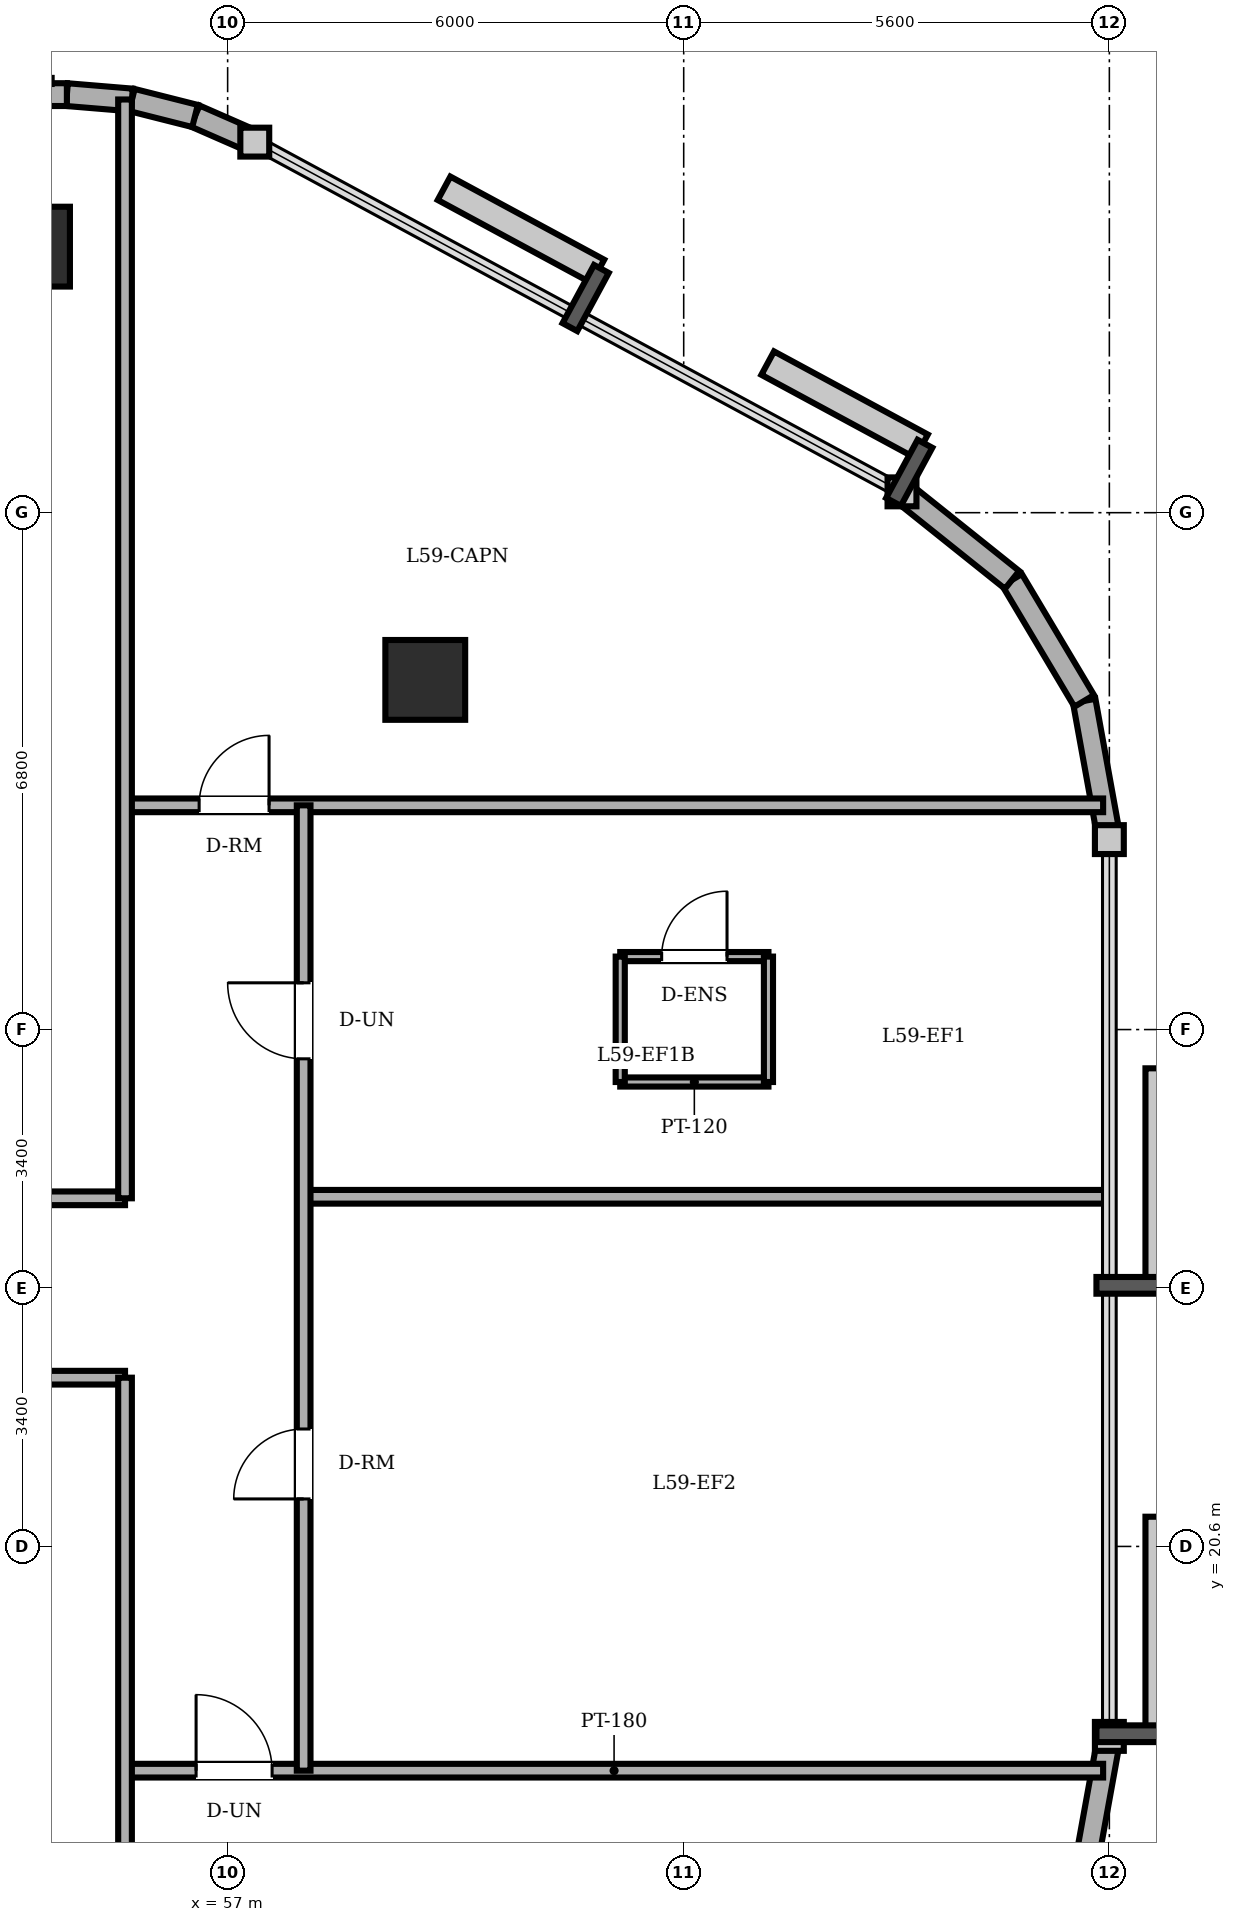
"""IFC4 building model, lengths in metres.
Left out: names, types, materials, properties, quantities, classifications, styles, units other than length and angle.
Written with IfcOpenShell. Run it as: python <this file> out.ifc"""

import sys

from ifc_helpers import new_model, si_unit, direction, frame, frame_2d, origin, origin_2d, place, context, subcontext, project, spatial, rectangle, circle, extrude, element, fill, save


model = new_model("IFC4")
c1 = context("Model", 3, precision=1e-05, world=origin(), true_north=direction((0.0, 1.0)))
c2 = subcontext(c1, "Body", "Model", "MODEL_VIEW")
j1 = project(units=[si_unit("LENGTHUNIT", "METRE"), si_unit("PLANEANGLEUNIT", "RADIAN")], contexts=[c1])
p1 = place(None, origin())
s1 = spatial("IfcSite", under=j1, at=p1, CompositionType="ELEMENT")
p2 = place(p1, origin())
s2 = spatial("IfcBuilding", under=s1, at=p2, CompositionType="ELEMENT")
p3 = place(p2, frame((0.0, 0.0, 226.5)))
s3 = spatial("IfcBuildingStorey", under=s2, at=p3, CompositionType="ELEMENT", Elevation=226.5)
for number, where, z_axis, x_axis in (
    (1, (59.6, 32.0, 0.0), (0.0, 0.0, 1.0), (1.0, 0.0, 0.0)),
    (2, (54.4, 37.7, 0.0), (0.0, 0.0, 1.0), (1.0, 0.0, 0.0)),
):
    element("IfcColumn", number, at=place(p3, frame(where, z_axis=z_axis, x_axis=x_axis)), inside=s3, PredefinedType="COLUMN", context=c2, shape_type="SweptSolid", body=[
        extrude(circle(Radius=0.525, at=origin_2d()), origin(), (0.0, 0.0, 1.0), 3.6),
    ])
for number, where, z_axis, x_axis in (
    (3, (68.269, 16.276, 0.0), (0.0, 0.0, 1.0), (0.178, 0.984, 0.0)),
    (4, (68.6, 29.899, 0.0), (0.0, 0.0, 1.0), (-0.178, 0.984, 0.0)),
):
    element("IfcWall", number, at=place(p3, frame(where, z_axis=z_axis, x_axis=x_axis)), inside=s3, PredefinedType="SOLIDWALL", context=c2, shape_type="SweptSolid", body=[
        extrude(rectangle(XDim=1.855, YDim=0.3, at=frame_2d((0.927, 0.0))), origin(), (0.0, 0.0, 1.0), 3.4),
    ])
p4 = place(p3, frame((68.269, 31.724, 0.0), z_axis=(0.0, 0.0, 1.0), x_axis=(-0.512072018927, 0.858942516955, 0.0)))
e5 = element("IfcWall", 5, at=p4, inside=s3, PredefinedType="SOLIDWALL", context=c2, shape_type="SweptSolid", body=[
    extrude(rectangle(XDim=1.853, YDim=0.3, at=frame_2d((0.927, 0.0))), origin(), (0.0, 0.0, 1.0), 3.4),
])
p5 = place(p3, frame((67.32, 33.316, 0.0), z_axis=(0.0, 0.0, 1.0), x_axis=(-0.780920189257, 0.624630817372, 0.0)))
e6 = element("IfcWall", 6, at=p5, inside=s3, PredefinedType="SOLIDWALL", context=c2, shape_type="SweptSolid", body=[
    extrude(rectangle(XDim=1.854, YDim=0.3, at=frame_2d((0.927, 0.0))), origin(), (0.0, 0.0, 1.0), 3.4),
])
p6 = place(p3, frame((57.357, 39.075, 0.0), z_axis=(0.0, 0.0, 1.0), x_axis=(-0.916085473636, 0.400983048261, 0.0)))
e7 = element("IfcWall", 7, at=p6, inside=s3, PredefinedType="SOLIDWALL", context=c2, shape_type="SweptSolid", body=[
    extrude(rectangle(XDim=0.858, YDim=0.3, at=frame_2d((0.429, 0.0))), origin(), (0.0, 0.0, 1.0), 3.4),
])
p7 = place(p3, frame((56.571, 39.419, 0.0), z_axis=(0.0, 0.0, 1.0), x_axis=(-0.969536346338, 0.244947490555, 0.0)))
e8 = element("IfcWall", 8, at=p7, inside=s3, PredefinedType="SOLIDWALL", context=c2, shape_type="SweptSolid", body=[
    extrude(rectangle(XDim=0.857, YDim=0.3, at=frame_2d((0.429, 0.0))), origin(), (0.0, 0.0, 1.0), 3.4),
])
p8 = place(p3, frame((55.74, 39.629, 0.0), z_axis=(0.0, 0.0, 1.0), x_axis=(-0.996565355958, 0.082809971041, 0.0)))
e9 = element("IfcWall", 9, at=p8, inside=s3, PredefinedType="SOLIDWALL", context=c2, shape_type="SweptSolid", body=[
    extrude(rectangle(XDim=0.858, YDim=0.3, at=frame_2d((0.429, 0.0))), origin(), (0.0, 0.0, 1.0), 3.4),
])
p9 = place(p3, frame((54.885, 39.7, 0.0), z_axis=(0.0, 0.0, 1.0), x_axis=(-1.0, 0.0, 0.0)))
e10 = element("IfcWall", 10, at=p9, inside=s3, PredefinedType="SOLIDWALL", context=c2, shape_type="SweptSolid", body=[
    extrude(rectangle(XDim=32.485, YDim=0.3, at=frame_2d((16.243, 0.0))), origin(), (0.0, 0.0, 1.0), 3.4),
])
p10 = place(p9, frame((23.61, 0.0, 0.0)))
e11 = element("IfcOpeningElement", 11, at=p10, cuts=e10, PredefinedType="OPENING", context=c2, shape_type="SweptSolid", body=[
    extrude(rectangle(XDim=0.95, YDim=2.2, at=frame_2d((0.475, 1.1))), frame((0.0, 0.16, 0.0), z_axis=(0.0, -1.0, 0.0), x_axis=(1.0, 0.0, 0.0)), (0.0, 0.0, 1.0), 0.32),
])
p11 = place(p9, frame((4.57, 0.0, 0.85)))
e12 = element("IfcOpeningElement", 12, at=p11, cuts=e10, PredefinedType="OPENING", context=c2, shape_type="SweptSolid", body=[
    extrude(rectangle(XDim=1.35, YDim=1.55, at=frame_2d((0.675, 0.775))), frame((0.0, 0.16, 0.0), z_axis=(0.0, -1.0, 0.0), x_axis=(1.0, 0.0, 0.0)), (0.0, 0.0, 1.0), 0.32),
])
p12 = place(p9, frame((9.465, 0.0, 0.85)))
e13 = element("IfcOpeningElement", 13, at=p12, cuts=e10, PredefinedType="OPENING", context=c2, shape_type="SweptSolid", body=[
    extrude(rectangle(XDim=1.35, YDim=1.55, at=frame_2d((0.675, 0.775))), frame((0.0, 0.16, 0.0), z_axis=(0.0, -1.0, 0.0), x_axis=(1.0, 0.0, 0.0)), (0.0, 0.0, 1.0), 0.32),
])
p13 = place(p9, frame((16.577, 0.0, 0.85)))
e14 = element("IfcOpeningElement", 14, at=p13, cuts=e10, PredefinedType="OPENING", context=c2, shape_type="SweptSolid", body=[
    extrude(rectangle(XDim=1.35, YDim=1.55, at=frame_2d((0.675, 0.775))), frame((0.0, 0.16, 0.0), z_axis=(0.0, -1.0, 0.0), x_axis=(1.0, 0.0, 0.0)), (0.0, 0.0, 1.0), 0.32),
])
p14 = place(p9, frame((18.793, 0.0, 0.85)))
e15 = element("IfcOpeningElement", 15, at=p14, cuts=e10, PredefinedType="OPENING", context=c2, shape_type="SweptSolid", body=[
    extrude(rectangle(XDim=1.35, YDim=1.55, at=frame_2d((0.675, 0.775))), frame((0.0, 0.16, 0.0), z_axis=(0.0, -1.0, 0.0), x_axis=(1.0, 0.0, 0.0)), (0.0, 0.0, 1.0), 0.32),
])
p15 = place(p9, frame((26.51, 0.0, 0.85)))
e16 = element("IfcOpeningElement", 16, at=p15, cuts=e10, PredefinedType="OPENING", context=c2, shape_type="SweptSolid", body=[
    extrude(rectangle(XDim=1.35, YDim=1.55, at=frame_2d((0.675, 0.775))), frame((0.0, 0.16, 0.0), z_axis=(0.0, -1.0, 0.0), x_axis=(1.0, 0.0, 0.0)), (0.0, 0.0, 1.0), 0.32),
])
p16 = place(p9, frame((29.835, 0.0, 0.85)))
e17 = element("IfcOpeningElement", 17, at=p16, cuts=e10, PredefinedType="OPENING", context=c2, shape_type="SweptSolid", body=[
    extrude(rectangle(XDim=1.35, YDim=1.55, at=frame_2d((0.675, 0.775))), frame((0.0, 0.16, 0.0), z_axis=(0.0, -1.0, 0.0), x_axis=(1.0, 0.0, 0.0)), (0.0, 0.0, 1.0), 0.32),
])
p17 = place(p3, frame((62.165, 28.36, 0.0), z_axis=(0.0, 0.0, 1.0), x_axis=(1.0, 0.0, 0.0)))
e18 = element("IfcWall", 18, at=p17, inside=s3, PredefinedType="PARTITIONING", context=c2, shape_type="SweptSolid", body=[
    extrude(rectangle(XDim=1.95, YDim=0.12, at=frame_2d((0.975, 0.0))), origin(), (0.0, 0.0, 1.0), 3.4),
])
p18 = place(p17, frame((0.545, 0.0, 0.0)))
e19 = element("IfcOpeningElement", 19, at=p18, cuts=e18, PredefinedType="OPENING", context=c2, shape_type="SweptSolid", body=[
    extrude(rectangle(XDim=0.86, YDim=2.1, at=frame_2d((0.43, 1.05))), frame((0.0, 0.07, 0.0), z_axis=(0.0, -1.0, 0.0), x_axis=(1.0, 0.0, 0.0)), (0.0, 0.0, 1.0), 0.14),
])
p19 = place(p3, frame((64.115, 26.71, 0.0), z_axis=(0.0, 0.0, 1.0), x_axis=(-1.0, 0.0, 0.0)))
e20 = element("IfcWall", 20, at=p19, inside=s3, PredefinedType="PARTITIONING", context=c2, shape_type="SweptSolid", body=[
    extrude(rectangle(XDim=1.95, YDim=0.12, at=frame_2d((0.975, 0.0))), origin(), (0.0, 0.0, 1.0), 3.4),
])
for number, where, z_axis, x_axis in (
    (21, (62.165, 28.36, 0.0), (0.0, 0.0, 1.0), (0.0, -1.0, 0.0)),
    (22, (64.115, 26.71, 0.0), (0.0, 0.0, 1.0), (0.0, 1.0, 0.0)),
):
    element("IfcWall", number, at=place(p3, frame(where, z_axis=z_axis, x_axis=x_axis)), inside=s3, PredefinedType="PARTITIONING", context=c2, shape_type="SweptSolid", body=[
        extrude(rectangle(XDim=1.65, YDim=0.12, at=frame_2d((0.825, 0.0))), origin(), (0.0, 0.0, 1.0), 3.4),
    ])
p20 = place(p3, frame((55.65, 17.65, 0.0), z_axis=(0.0, 0.0, 1.0), x_axis=(1.0, 0.0, 0.0)))
e23 = element("IfcWall", 23, at=p20, inside=s3, PredefinedType="PARTITIONING", context=c2, shape_type="SweptSolid", body=[
    extrude(rectangle(XDim=12.868, YDim=0.18, at=frame_2d((6.434, 0.0))), origin(), (0.0, 0.0, 1.0), 3.4),
])
p21 = place(p20, frame((0.935, 0.0, 0.0)))
e24 = element("IfcOpeningElement", 24, at=p21, cuts=e23, PredefinedType="OPENING", context=c2, shape_type="SweptSolid", body=[
    extrude(rectangle(XDim=1.0, YDim=2.15, at=frame_2d((0.5, 1.075))), frame((0.0, 0.1, 0.0), z_axis=(0.0, -1.0, 0.0), x_axis=(1.0, 0.0, 0.0)), (0.0, 0.0, 1.0), 0.2),
])
p22 = place(p3, frame((39.85, 22.82, 0.0), z_axis=(0.0, 0.0, 1.0), x_axis=(1.0, 0.0, 0.0)))
e25 = element("IfcWall", 25, at=p22, inside=s3, PredefinedType="PARTITIONING", context=c2, shape_type="SweptSolid", body=[
    extrude(rectangle(XDim=15.8, YDim=0.18, at=frame_2d((7.9, 0.0))), origin(), (0.0, 0.0, 1.0), 3.4),
])
p23 = place(p22, frame((7.44, 0.0, 0.0)))
e26 = element("IfcOpeningElement", 26, at=p23, cuts=e25, PredefinedType="OPENING", context=c2, shape_type="SweptSolid", body=[
    extrude(rectangle(XDim=0.92, YDim=2.1, at=frame_2d((0.46, 1.05))), frame((0.0, 0.1, 0.0), z_axis=(0.0, -1.0, 0.0), x_axis=(1.0, 0.0, 0.0)), (0.0, 0.0, 1.0), 0.2),
])
p24 = place(p3, frame((39.85, 25.18, 0.0), z_axis=(0.0, 0.0, 1.0), x_axis=(1.0, 0.0, 0.0)))
e27 = element("IfcWall", 27, at=p24, inside=s3, PredefinedType="PARTITIONING", context=c2, shape_type="SweptSolid", body=[
    extrude(rectangle(XDim=15.8, YDim=0.18, at=frame_2d((7.9, 0.0))), origin(), (0.0, 0.0, 1.0), 3.4),
])
p25 = place(p24, frame((7.44, 0.0, 0.0)))
e28 = element("IfcOpeningElement", 28, at=p25, cuts=e27, PredefinedType="OPENING", context=c2, shape_type="SweptSolid", body=[
    extrude(rectangle(XDim=0.92, YDim=2.1, at=frame_2d((0.46, 1.05))), frame((0.0, 0.1, 0.0), z_axis=(0.0, -1.0, 0.0), x_axis=(1.0, 0.0, 0.0)), (0.0, 0.0, 1.0), 0.2),
])
p26 = place(p3, frame((58.0, 25.2, 0.0), z_axis=(0.0, 0.0, 1.0), x_axis=(1.0, 0.0, 0.0)))
e29 = element("IfcWall", 29, at=p26, inside=s3, PredefinedType="PARTITIONING", context=c2, shape_type="SweptSolid", body=[
    extrude(rectangle(XDim=10.6, YDim=0.18, at=frame_2d((5.3, 0.0))), origin(), (0.0, 0.0, 1.0), 3.4),
])
p27 = place(p3, frame((55.65, 30.35, 0.0), z_axis=(0.0, 0.0, 1.0), x_axis=(1.0, 0.0, 0.0)))
e30 = element("IfcWall", 30, at=p27, inside=s3, PredefinedType="PARTITIONING", context=c2, shape_type="SweptSolid", body=[
    extrude(rectangle(XDim=12.868, YDim=0.18, at=frame_2d((6.434, 0.0))), origin(), (0.0, 0.0, 1.0), 3.4),
])
p28 = place(p27, frame((0.975, 0.0, 0.0)))
e31 = element("IfcOpeningElement", 31, at=p28, cuts=e30, PredefinedType="OPENING", context=c2, shape_type="SweptSolid", body=[
    extrude(rectangle(XDim=0.92, YDim=2.1, at=frame_2d((0.46, 1.05))), frame((0.0, 0.1, 0.0), z_axis=(0.0, -1.0, 0.0), x_axis=(1.0, 0.0, 0.0)), (0.0, 0.0, 1.0), 0.2),
])
for number, where, z_axis, x_axis in (
    (32, (55.65, 8.364, 0.0), (0.0, 0.0, 1.0), (0.0, 1.0, 0.0)),
    (33, (55.65, 25.18, 0.0), (0.0, 0.0, 1.0), (0.0, 1.0, 0.0)),
):
    element("IfcWall", number, at=place(p3, frame(where, z_axis=z_axis, x_axis=x_axis)), inside=s3, PredefinedType="PARTITIONING", context=c2, shape_type="SweptSolid", body=[
        extrude(rectangle(XDim=14.456, YDim=0.18, at=frame_2d((7.228, 0.0))), origin(), (0.0, 0.0, 1.0), 3.4),
    ])
p29 = place(p3, frame((58.0, 17.65, 0.0), z_axis=(0.0, 0.0, 1.0), x_axis=(0.0, 1.0, 0.0)))
e34 = element("IfcWall", 34, at=p29, inside=s3, PredefinedType="PARTITIONING", context=c2, shape_type="SweptSolid", body=[
    extrude(rectangle(XDim=12.7, YDim=0.18, at=frame_2d((6.35, 0.0))), origin(), (0.0, 0.0, 1.0), 3.4),
])
p30 = place(p29, frame((9.365, 0.0, 0.0)))
e35 = element("IfcOpeningElement", 35, at=p30, cuts=e34, PredefinedType="OPENING", context=c2, shape_type="SweptSolid", body=[
    extrude(rectangle(XDim=1.0, YDim=2.15, at=frame_2d((0.5, 1.075))), frame((0.0, 0.1, 0.0), z_axis=(0.0, -1.0, 0.0), x_axis=(1.0, 0.0, 0.0)), (0.0, 0.0, 1.0), 0.2),
])
p31 = place(p29, frame((3.575, 0.0, 0.0)))
e36 = element("IfcOpeningElement", 36, at=p31, cuts=e34, PredefinedType="OPENING", context=c2, shape_type="SweptSolid", body=[
    extrude(rectangle(XDim=0.92, YDim=2.1, at=frame_2d((0.46, 1.05))), frame((0.0, 0.1, 0.0), z_axis=(0.0, -1.0, 0.0), x_axis=(1.0, 0.0, 0.0)), (0.0, 0.0, 1.0), 0.2),
])
p32 = place(p18, origin())
e37 = element("IfcDoor", 37, at=p32, inside=s3, OperationType="SINGLE_SWING_RIGHT", PredefinedType="DOOR", context=c2, shape_type="SweptSolid", body=[
    extrude(rectangle(XDim=0.86, YDim=2.1, at=frame_2d((0.43, 1.05))), frame((0.0, 0.025, 0.0), z_axis=(0.0, -1.0, 0.0), x_axis=(1.0, 0.0, 0.0)), (0.0, 0.0, 1.0), 0.05),
])
fill(e19, e37)
p33 = place(p28, origin())
e38 = element("IfcDoor", 38, at=p33, inside=s3, OperationType="SINGLE_SWING_RIGHT", PredefinedType="DOOR", context=c2, shape_type="SweptSolid", body=[
    extrude(rectangle(XDim=0.92, YDim=2.1, at=frame_2d((0.46, 1.05))), frame((0.0, 0.025, 0.0), z_axis=(0.0, -1.0, 0.0), x_axis=(1.0, 0.0, 0.0)), (0.0, 0.0, 1.0), 0.05),
])
fill(e31, e38)
p34 = place(p21, origin())
e39 = element("IfcDoor", 39, at=p34, inside=s3, OperationType="SINGLE_SWING_LEFT", PredefinedType="DOOR", context=c2, shape_type="SweptSolid", body=[
    extrude(rectangle(XDim=1.0, YDim=2.15, at=frame_2d((0.5, 1.075))), frame((0.0, 0.025, 0.0), z_axis=(0.0, -1.0, 0.0), x_axis=(1.0, 0.0, 0.0)), (0.0, 0.0, 1.0), 0.05),
])
fill(e24, e39)
p35 = place(p30, origin())
e40 = element("IfcDoor", 40, at=p35, inside=s3, OperationType="SINGLE_SWING_RIGHT", PredefinedType="DOOR", context=c2, shape_type="SweptSolid", body=[
    extrude(rectangle(XDim=1.0, YDim=2.15, at=frame_2d((0.5, 1.075))), frame((0.0, 0.025, 0.0), z_axis=(0.0, -1.0, 0.0), x_axis=(1.0, 0.0, 0.0)), (0.0, 0.0, 1.0), 0.05),
])
fill(e35, e40)
p36 = place(p31, origin())
e41 = element("IfcDoor", 41, at=p36, inside=s3, OperationType="SINGLE_SWING_LEFT", PredefinedType="DOOR", context=c2, shape_type="SweptSolid", body=[
    extrude(rectangle(XDim=0.92, YDim=2.1, at=frame_2d((0.46, 1.05))), frame((0.0, 0.025, 0.0), z_axis=(0.0, -1.0, 0.0), x_axis=(1.0, 0.0, 0.0)), (0.0, 0.0, 1.0), 0.05),
])
fill(e36, e41)
save(model, sys.argv[1])
